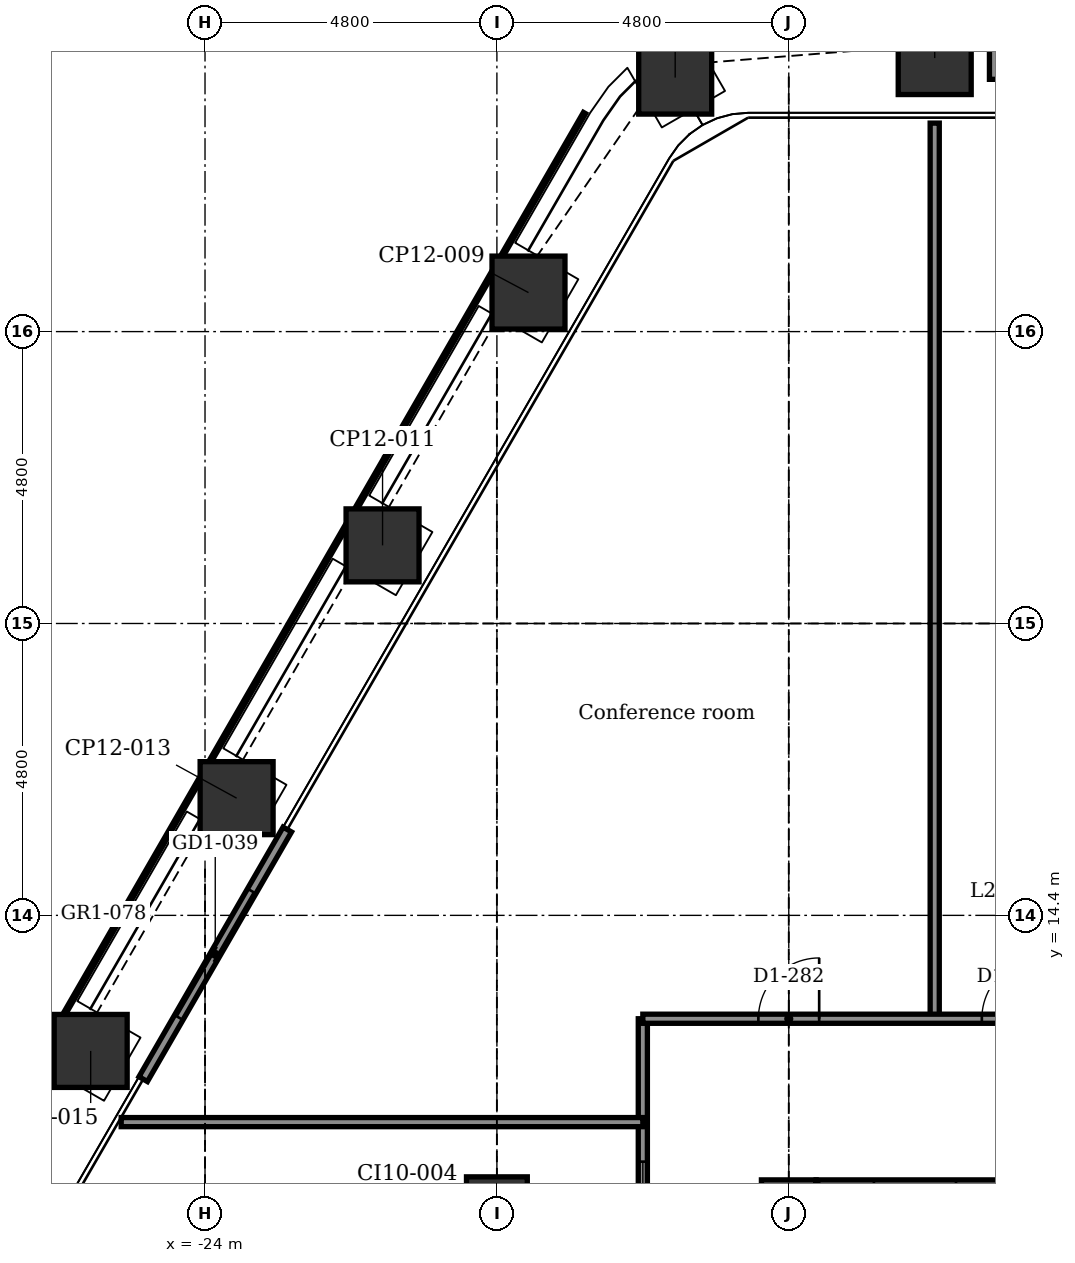
"""IFC4 building model, lengths in metres.
Left out: names, types, materials, properties, quantities, classifications, styles, units other than length and angle.
Written with IfcOpenShell. Run it as: python <this file> out.ifc"""

import sys

from ifc_helpers import new_model, si_unit, direction, frame, frame_2d, origin, origin_2d, place, context, subcontext, project, spatial, rectangle, extrude, element, fill, save


model = new_model("IFC4")
c1 = context("Model", 3, precision=1e-05, world=origin(), true_north=direction((0.0, 1.0)))
c2 = subcontext(c1, "Body", "Model", "MODEL_VIEW")
j1 = project(units=[si_unit("LENGTHUNIT", "METRE"), si_unit("PLANEANGLEUNIT", "RADIAN")], contexts=[c1])
p1 = place(None, origin())
s1 = spatial("IfcSite", under=j1, at=p1, CompositionType="ELEMENT")
p2 = place(p1, origin())
s2 = spatial("IfcBuilding", under=s1, at=p2, CompositionType="ELEMENT")
p3 = place(p2, frame((0.0, 0.0, 109.4)))
s3 = spatial("IfcBuildingStorey", under=s2, at=p3, CompositionType="ELEMENT", Elevation=109.4)
for number, where, z_axis, x_axis in (
    (1, (-16.268, 28.177, -0.2), (0.0, 0.0, 1.0), (0.866, 0.5, 0.0)),
    (2, (-12.0, 28.499, -0.2), (0.0, 0.0, 1.0), (1.0, 0.0, 0.0)),
    (3, (-25.88, 12.171, -0.2), (0.0, 0.0, 1.0), (0.5, 0.866, 0.0)),
    (4, (-23.48, 16.328, -0.2), (0.0, 0.0, 1.0), (0.5, 0.866, 0.0)),
    (5, (-21.08, 20.485, -0.2), (0.0, 0.0, 1.0), (0.5, 0.866, 0.0)),
    (6, (-18.68, 24.642, -0.2), (0.0, 0.0, 1.0), (0.5, 0.866, 0.0)),
):
    element("IfcColumn", number, at=place(p3, frame(where, z_axis=z_axis, x_axis=x_axis)), inside=s3, PredefinedType="COLUMN", context=c2, shape_type="SweptSolid", body=[
        extrude(rectangle(XDim=1.2, YDim=1.2, at=origin_2d()), origin(), (0.0, 0.0, 1.0), 4.5),
    ])
p4 = place(p3, frame((-19.2, 9.6, -0.2), z_axis=(0.0, 0.0, 1.0), x_axis=(1.0, 0.0, 0.0)))
e7 = element("IfcColumn", 7, at=p4, inside=s3, PredefinedType="COLUMN", context=c2, shape_type="SweptSolid", body=[
    extrude(rectangle(XDim=1.0, YDim=1.0, at=origin_2d()), origin(), (0.0, 0.0, 1.0), 4.5),
])
p5 = place(p3, frame((-13.95, 9.6, -0.2), z_axis=(0.0, 0.0, 1.0), x_axis=(1.0, 0.0, 0.0)))
e8 = element("IfcWall", 8, at=p5, inside=s3, PredefinedType="SHEAR", context=c2, shape_type="SweptSolid", body=[
    extrude(rectangle(XDim=3.9, YDim=0.9, at=frame_2d((1.95, 0.0))), origin(), (0.0, 0.0, 1.0), 4.5),
])
p6 = place(p5, frame((0.05, 0.0, 0.2)))
e9 = element("IfcOpeningElement", 9, at=p6, cuts=e8, PredefinedType="OPENING", context=c2, shape_type="SweptSolid", body=[
    extrude(rectangle(XDim=0.9, YDim=2.1, at=frame_2d((0.45, 1.05))), frame((0.0, 0.46, 0.0), z_axis=(0.0, -1.0, 0.0), x_axis=(1.0, 0.0, 0.0)), (0.0, 0.0, 1.0), 0.92),
])
p7 = place(p5, frame((2.3, 0.0, 0.2)))
e10 = element("IfcOpeningElement", 10, at=p7, cuts=e8, PredefinedType="OPENING", context=c2, shape_type="SweptSolid", body=[
    extrude(rectangle(XDim=0.9, YDim=2.1, at=frame_2d((0.45, 1.05))), frame((0.0, 0.46, 0.0), z_axis=(0.0, -1.0, 0.0), x_axis=(1.0, 0.0, 0.0)), (0.0, 0.0, 1.0), 0.92),
])
p8 = place(p3, frame((-14.4, -10.05, -0.2), z_axis=(0.0, 0.0, 1.0), x_axis=(0.0, 1.0, 0.0)))
e11 = element("IfcWall", 11, at=p8, inside=s3, PredefinedType="SHEAR", context=c2, shape_type="SweptSolid", body=[
    extrude(rectangle(XDim=20.1, YDim=0.9, at=frame_2d((10.05, 0.0))), origin(), (0.0, 0.0, 1.0), 4.5),
])
p9 = place(p8, frame((3.5, 0.0, 0.2)))
e12 = element("IfcOpeningElement", 12, at=p9, cuts=e11, PredefinedType="OPENING", context=c2, shape_type="SweptSolid", body=[
    extrude(rectangle(XDim=1.1, YDim=2.1, at=frame_2d((0.55, 1.05))), frame((0.0, 0.46, 0.0), z_axis=(0.0, -1.0, 0.0), x_axis=(1.0, 0.0, 0.0)), (0.0, 0.0, 1.0), 0.92),
])
p10 = place(p8, frame((5.9, 0.0, 0.2)))
e13 = element("IfcOpeningElement", 13, at=p10, cuts=e11, PredefinedType="OPENING", context=c2, shape_type="SweptSolid", body=[
    extrude(rectangle(XDim=1.1, YDim=2.1, at=frame_2d((0.55, 1.05))), frame((0.0, 0.46, 0.0), z_axis=(0.0, -1.0, 0.0), x_axis=(1.0, 0.0, 0.0)), (0.0, 0.0, 1.0), 0.92),
])
p11 = place(p8, frame((8.3, 0.0, 0.2)))
e14 = element("IfcOpeningElement", 14, at=p11, cuts=e11, PredefinedType="OPENING", context=c2, shape_type="SweptSolid", body=[
    extrude(rectangle(XDim=1.1, YDim=2.1, at=frame_2d((0.55, 1.05))), frame((0.0, 0.46, 0.0), z_axis=(0.0, -1.0, 0.0), x_axis=(1.0, 0.0, 0.0)), (0.0, 0.0, 1.0), 0.92),
])
p12 = place(p8, frame((10.7, 0.0, 0.2)))
e15 = element("IfcOpeningElement", 15, at=p12, cuts=e11, PredefinedType="OPENING", context=c2, shape_type="SweptSolid", body=[
    extrude(rectangle(XDim=1.1, YDim=2.1, at=frame_2d((0.55, 1.05))), frame((0.0, 0.46, 0.0), z_axis=(0.0, -1.0, 0.0), x_axis=(1.0, 0.0, 0.0)), (0.0, 0.0, 1.0), 0.92),
])
p13 = place(p3, frame((-25.017, 11.707, 0.0), z_axis=(0.0, 0.0, 1.0), x_axis=(0.499978080042, 0.866038058908, 0.0)))
e16 = element("IfcWall", 16, at=p13, inside=s3, PredefinedType="PARTITIONING", context=c2, shape_type="SweptSolid", body=[
    extrude(rectangle(XDim=4.74, YDim=0.16, at=frame_2d((2.37, 0.0))), origin(), (0.0, 0.0, 1.0), 4.3),
])
p14 = place(p13, frame((1.17, 0.0, 0.0)))
e17 = element("IfcOpeningElement", 17, at=p14, cuts=e16, PredefinedType="OPENING", context=c2, shape_type="SweptSolid", body=[
    extrude(rectangle(XDim=2.4, YDim=2.4, at=frame_2d((1.2, 1.2))), frame((0.0, 0.09, 0.0), z_axis=(0.0, -1.0, 0.0), x_axis=(1.0, 0.0, 0.0)), (0.0, 0.0, 1.0), 0.18),
])
p15 = place(p3, frame((-11.1, 28.448, 0.0), z_axis=(0.0, 0.0, 1.0), x_axis=(1.0, 0.0, 0.0)))
e18 = element("IfcWall", 18, at=p15, inside=s3, PredefinedType="USERDEFINED", context=c2, shape_type="SweptSolid", body=[
    extrude(rectangle(XDim=3.0, YDim=0.6, at=frame_2d((1.5, 0.0))), origin(), (0.0, 0.0, 1.0), 0.7),
])
p16 = place(p3, frame((-12.0, 12.7, 0.0), z_axis=(0.0, 0.0, 1.0), x_axis=(0.0, 1.0, 0.0)))
e19 = element("IfcWall", 19, at=p16, inside=s3, PredefinedType="PARTITIONING", context=c2, shape_type="SweptSolid", body=[
    extrude(rectangle(XDim=14.729, YDim=0.15, at=frame_2d((7.364, 0.0))), origin(), (0.0, 0.0, 1.0), 4.3),
])
p17 = place(p3, frame((-16.8, 3.95, 0.0), z_axis=(0.0, 0.0, 1.0), x_axis=(0.0, 1.0, 0.0)))
e20 = element("IfcWall", 20, at=p17, inside=s3, PredefinedType="PARTITIONING", context=c2, shape_type="SweptSolid", body=[
    extrude(rectangle(XDim=8.75, YDim=0.15, at=frame_2d((4.375, 0.0))), origin(), (0.0, 0.0, 1.0), 4.3),
])
p18 = place(p17, frame((2.25, 0.0, 0.0)))
e21 = element("IfcOpeningElement", 21, at=p18, cuts=e20, PredefinedType="OPENING", context=c2, shape_type="SweptSolid", body=[
    extrude(rectangle(XDim=1.0, YDim=2.1, at=frame_2d((0.5, 1.05))), frame((0.0, 0.085, 0.0), z_axis=(0.0, -1.0, 0.0), x_axis=(1.0, 0.0, 0.0)), (0.0, 0.0, 1.0), 0.17),
])
p19 = place(p17, frame((4.6, 0.0, 0.9)))
e22 = element("IfcOpeningElement", 22, at=p19, cuts=e20, PredefinedType="OPENING", context=c2, shape_type="SweptSolid", body=[
    extrude(rectangle(XDim=1.8, YDim=1.5, at=frame_2d((0.9, 0.75))), frame((0.0, 0.085, 0.0), z_axis=(0.0, -1.0, 0.0), x_axis=(1.0, 0.0, 0.0)), (0.0, 0.0, 1.0), 0.17),
])
p20 = place(p3, frame((-25.378, 11.0, 0.0), z_axis=(0.0, 0.0, 1.0), x_axis=(1.0, 0.0, 0.0)))
e23 = element("IfcWall", 23, at=p20, inside=s3, PredefinedType="PARTITIONING", context=c2, shape_type="SweptSolid", body=[
    extrude(rectangle(XDim=8.578, YDim=0.15, at=frame_2d((4.289, 0.0))), origin(), (0.0, 0.0, 1.0), 4.3),
])
p21 = place(p3, frame((-16.8, 12.7, 0.0), z_axis=(0.0, 0.0, 1.0), x_axis=(1.0, 0.0, 0.0)))
e24 = element("IfcWall", 24, at=p21, inside=s3, PredefinedType="PARTITIONING", context=c2, shape_type="SweptSolid", body=[
    extrude(rectangle(XDim=33.6, YDim=0.15, at=frame_2d((16.8, 0.0))), origin(), (0.0, 0.0, 1.0), 4.3),
])
p22 = place(p21, frame((1.9, 0.0, 0.0)))
e25 = element("IfcOpeningElement", 25, at=p22, cuts=e24, PredefinedType="OPENING", context=c2, shape_type="SweptSolid", body=[
    extrude(rectangle(XDim=1.0, YDim=2.1, at=frame_2d((0.5, 1.05))), frame((0.0, 0.085, 0.0), z_axis=(0.0, -1.0, 0.0), x_axis=(1.0, 0.0, 0.0)), (0.0, 0.0, 1.0), 0.17),
])
p23 = place(p21, frame((5.575, 0.0, 0.0)))
e26 = element("IfcOpeningElement", 26, at=p23, cuts=e24, PredefinedType="OPENING", context=c2, shape_type="SweptSolid", body=[
    extrude(rectangle(XDim=1.0, YDim=2.1, at=frame_2d((0.5, 1.05))), frame((0.0, 0.085, 0.0), z_axis=(0.0, -1.0, 0.0), x_axis=(1.0, 0.0, 0.0)), (0.0, 0.0, 1.0), 0.17),
])
p24 = place(p21, frame((8.665, 0.0, 0.0)))
e27 = element("IfcOpeningElement", 27, at=p24, cuts=e24, PredefinedType="OPENING", context=c2, shape_type="SweptSolid", body=[
    extrude(rectangle(XDim=1.0, YDim=2.1, at=frame_2d((0.5, 1.05))), frame((0.0, 0.085, 0.0), z_axis=(0.0, -1.0, 0.0), x_axis=(1.0, 0.0, 0.0)), (0.0, 0.0, 1.0), 0.17),
])
p25 = place(p21, frame((13.9, 0.0, 0.0)))
e28 = element("IfcOpeningElement", 28, at=p25, cuts=e24, PredefinedType="OPENING", context=c2, shape_type="SweptSolid", body=[
    extrude(rectangle(XDim=1.0, YDim=2.1, at=frame_2d((0.5, 1.05))), frame((0.0, 0.085, 0.0), z_axis=(0.0, -1.0, 0.0), x_axis=(1.0, 0.0, 0.0)), (0.0, 0.0, 1.0), 0.17),
])
p26 = place(p21, frame((18.7, 0.0, 0.0)))
e29 = element("IfcOpeningElement", 29, at=p26, cuts=e24, PredefinedType="OPENING", context=c2, shape_type="SweptSolid", body=[
    extrude(rectangle(XDim=1.0, YDim=2.1, at=frame_2d((0.5, 1.05))), frame((0.0, 0.085, 0.0), z_axis=(0.0, -1.0, 0.0), x_axis=(1.0, 0.0, 0.0)), (0.0, 0.0, 1.0), 0.17),
])
p27 = place(p21, frame((24.515, 0.0, 0.0)))
e30 = element("IfcOpeningElement", 30, at=p27, cuts=e24, PredefinedType="OPENING", context=c2, shape_type="SweptSolid", body=[
    extrude(rectangle(XDim=1.0, YDim=2.1, at=frame_2d((0.5, 1.05))), frame((0.0, 0.085, 0.0), z_axis=(0.0, -1.0, 0.0), x_axis=(1.0, 0.0, 0.0)), (0.0, 0.0, 1.0), 0.17),
])
p28 = place(p21, frame((27.645, 0.0, 0.0)))
e31 = element("IfcOpeningElement", 31, at=p28, cuts=e24, PredefinedType="OPENING", context=c2, shape_type="SweptSolid", body=[
    extrude(rectangle(XDim=1.0, YDim=2.1, at=frame_2d((0.5, 1.05))), frame((0.0, 0.085, 0.0), z_axis=(0.0, -1.0, 0.0), x_axis=(1.0, 0.0, 0.0)), (0.0, 0.0, 1.0), 0.17),
])
p29 = place(p14, origin())
e32 = element("IfcDoor", 32, at=p29, inside=s3, OperationType="DOUBLE_DOOR_SLIDING", PredefinedType="DOOR", context=c2, shape_type="SweptSolid", body=[
    extrude(rectangle(XDim=2.4, YDim=2.4, at=frame_2d((1.2, 1.2))), frame((0.0, 0.025, 0.0), z_axis=(0.0, -1.0, 0.0), x_axis=(1.0, 0.0, 0.0)), (0.0, 0.0, 1.0), 0.05),
])
fill(e17, e32)
p30 = place(p22, origin())
e33 = element("IfcDoor", 33, at=p30, inside=s3, OperationType="SINGLE_SWING_RIGHT", PredefinedType="DOOR", context=c2, shape_type="SweptSolid", body=[
    extrude(rectangle(XDim=1.0, YDim=2.1, at=frame_2d((0.5, 1.05))), frame((0.0, 0.025, 0.0), z_axis=(0.0, -1.0, 0.0), x_axis=(1.0, 0.0, 0.0)), (0.0, 0.0, 1.0), 0.05),
])
fill(e25, e33)
p31 = place(p23, origin())
e34 = element("IfcDoor", 34, at=p31, inside=s3, OperationType="SINGLE_SWING_RIGHT", PredefinedType="DOOR", context=c2, shape_type="SweptSolid", body=[
    extrude(rectangle(XDim=1.0, YDim=2.1, at=frame_2d((0.5, 1.05))), frame((0.0, 0.025, 0.0), z_axis=(0.0, -1.0, 0.0), x_axis=(1.0, 0.0, 0.0)), (0.0, 0.0, 1.0), 0.05),
])
fill(e26, e34)
p32 = place(p19, origin())
e35 = element("IfcWindow", 35, at=p32, inside=s3, PartitioningType="SINGLE_PANEL", PredefinedType="WINDOW", context=c2, shape_type="SweptSolid", body=[
    extrude(rectangle(XDim=1.8, YDim=1.5, at=frame_2d((0.9, 0.75))), frame((0.0, 0.03, 0.0), z_axis=(0.0, -1.0, 0.0), x_axis=(1.0, 0.0, 0.0)), (0.0, 0.0, 1.0), 0.06),
])
fill(e22, e35)
save(model, sys.argv[1])
